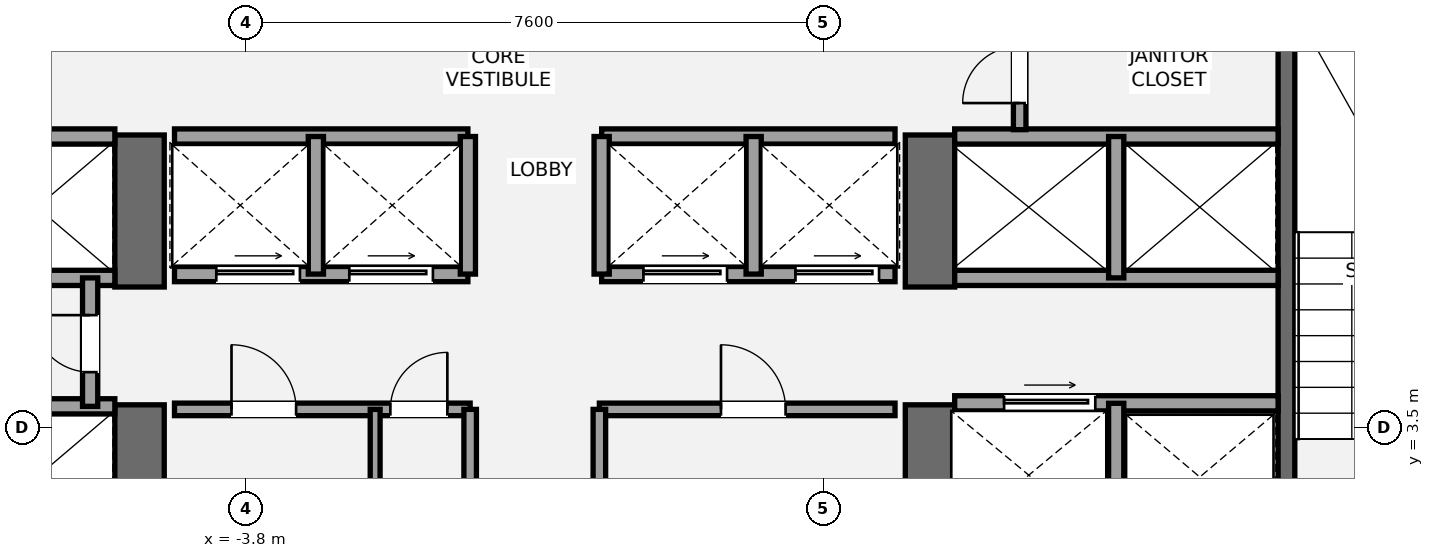
"""IFC4 building model, lengths in metres.
Left out: names, types, materials, properties, quantities, classifications, styles, units other than length and angle.
Written with IfcOpenShell. Run it as: python <this file> out.ifc"""

import sys

from ifc_helpers import new_model, si_unit, direction, frame, frame_2d, origin, place, context, subcontext, project, spatial, rectangle, extrude, element, fill, save


model = new_model("IFC4")
c1 = context("Model", 3, precision=1e-05, world=origin(), true_north=direction((0.0, 1.0)))
c2 = subcontext(c1, "Body", "Model", "MODEL_VIEW")
j1 = project(units=[si_unit("LENGTHUNIT", "METRE"), si_unit("PLANEANGLEUNIT", "RADIAN")], contexts=[c1])
p1 = place(None, origin())
s1 = spatial("IfcSite", under=j1, at=p1, CompositionType="ELEMENT")
p2 = place(p1, origin())
s2 = spatial("IfcBuilding", under=s1, at=p2, CompositionType="ELEMENT")
p3 = place(p2, frame((0.0, 0.0, 159.8)))
s3 = spatial("IfcBuildingStorey", under=s2, at=p3, CompositionType="ELEMENT", Elevation=159.8)
p4 = place(p3, frame((-5.2, 1.2, 0.0), z_axis=(0.0, 0.0, 1.0), x_axis=(0.0, 1.0, 0.0)))
e1 = element("IfcWall", 1, at=p4, inside=s3, PredefinedType="SHEAR", context=c2, shape_type="SweptSolid", body=[
    extrude(rectangle(XDim=2.6, YDim=0.65, at=frame_2d((1.3, 0.0))), origin(), (0.0, 0.0, 1.0), 3.2),
])
p5 = place(p3, frame((-5.2, 5.35, 0.0), z_axis=(0.0, 0.0, 1.0), x_axis=(0.0, 1.0, 0.0)))
e2 = element("IfcWall", 2, at=p5, inside=s3, PredefinedType="SHEAR", context=c2, shape_type="SweptSolid", body=[
    extrude(rectangle(XDim=2.0, YDim=0.65, at=frame_2d((1.0, 0.0))), origin(), (0.0, 0.0, 1.0), 3.2),
])
p6 = place(p3, frame((5.2, 1.2, 0.0), z_axis=(0.0, 0.0, 1.0), x_axis=(0.0, 1.0, 0.0)))
e3 = element("IfcWall", 3, at=p6, inside=s3, PredefinedType="SHEAR", context=c2, shape_type="SweptSolid", body=[
    extrude(rectangle(XDim=2.6, YDim=0.65, at=frame_2d((1.3, 0.0))), origin(), (0.0, 0.0, 1.0), 3.2),
])
p7 = place(p3, frame((5.2, 5.35, 0.0), z_axis=(0.0, 0.0, 1.0), x_axis=(0.0, 1.0, 0.0)))
e4 = element("IfcWall", 4, at=p7, inside=s3, PredefinedType="SHEAR", context=c2, shape_type="SweptSolid", body=[
    extrude(rectangle(XDim=2.0, YDim=0.65, at=frame_2d((1.0, 0.0))), origin(), (0.0, 0.0, 1.0), 3.2),
])
p8 = place(p3, frame((9.89, 1.85, 0.0), z_axis=(0.0, 0.0, 1.0), x_axis=(0.0, 1.0, 0.0)))
e5 = element("IfcWall", 5, at=p8, inside=s3, PredefinedType="SHEAR", context=c2, shape_type="SweptSolid", body=[
    extrude(rectangle(XDim=7.15, YDim=0.22, at=frame_2d((3.575, 0.0))), origin(), (0.0, 0.0, 1.0), 3.2),
])
for number, where, z_axis, x_axis in (
    (6, (-9.78, 3.78, 0.0), (0.0, 0.0, 1.0), (1.0, 0.0, 0.0)),
    (7, (-9.78, 5.47, 0.0), (0.0, 0.0, 1.0), (1.0, 0.0, 0.0)),
    (8, (-9.78, 7.33, 0.0), (0.0, 0.0, 1.0), (1.0, 0.0, 0.0)),
):
    element("IfcWall", number, at=place(p3, frame(where, z_axis=z_axis, x_axis=x_axis)), inside=s3, PredefinedType="SOLIDWALL", context=c2, shape_type="SweptSolid", body=[
        extrude(rectangle(XDim=4.255, YDim=0.2, at=frame_2d((2.127, 0.0))), origin(), (0.0, 0.0, 1.0), 3.02),
    ])
p9 = place(p3, frame((-5.85, 3.78, 0.0), z_axis=(0.0, 0.0, 1.0), x_axis=(0.0, 1.0, 0.0)))
e9 = element("IfcWall", 9, at=p9, inside=s3, PredefinedType="SOLIDWALL", context=c2, shape_type="SweptSolid", body=[
    extrude(rectangle(XDim=1.69, YDim=0.2, at=frame_2d((0.845, 0.0))), origin(), (0.0, 0.0, 1.0), 3.02),
])
p10 = place(p9, frame((0.45, 0.0, 0.0)))
e10 = element("IfcOpeningElement", 10, at=p10, cuts=e9, PredefinedType="OPENING", context=c2, shape_type="SweptSolid", body=[
    extrude(rectangle(XDim=0.75, YDim=2.1, at=frame_2d((0.375, 1.05))), frame((0.0, 0.11, 0.0), z_axis=(0.0, -1.0, 0.0), x_axis=(1.0, 0.0, 0.0)), (0.0, 0.0, 1.0), 0.22),
])
p11 = place(p3, frame((5.525, 3.82, 0.0), z_axis=(0.0, 0.0, 1.0), x_axis=(1.0, 0.0, 0.0)))
e11 = element("IfcWall", 11, at=p11, inside=s3, PredefinedType="SOLIDWALL", context=c2, shape_type="SweptSolid", body=[
    extrude(rectangle(XDim=4.255, YDim=0.2, at=frame_2d((2.127, 0.0))), origin(), (0.0, 0.0, 1.0), 3.02),
])
p12 = place(p11, frame((0.65, 0.0, 0.0)))
e12 = element("IfcOpeningElement", 12, at=p12, cuts=e11, PredefinedType="OPENING", context=c2, shape_type="SweptSolid", body=[
    extrude(rectangle(XDim=1.2, YDim=2.2, at=frame_2d((0.6, 1.1))), frame((0.0, 0.11, 0.0), z_axis=(0.0, -1.0, 0.0), x_axis=(1.0, 0.0, 0.0)), (0.0, 0.0, 1.0), 0.22),
])
p13 = place(p3, frame((7.65, 1.85, 0.0), z_axis=(0.0, 0.0, 1.0), x_axis=(0.0, 1.0, 0.0)))
e13 = element("IfcWall", 13, at=p13, inside=s3, PredefinedType="SOLIDWALL", context=c2, shape_type="SweptSolid", body=[
    extrude(rectangle(XDim=1.97, YDim=0.2, at=frame_2d((0.985, 0.0))), origin(), (0.0, 0.0, 1.0), 3.02),
])
for number, where, z_axis, x_axis in (
    (14, (5.525, 5.47, 0.0), (0.0, 0.0, 1.0), (1.0, 0.0, 0.0)),
    (15, (5.525, 7.33, 0.0), (0.0, 0.0, 1.0), (1.0, 0.0, 0.0)),
):
    element("IfcWall", number, at=place(p3, frame(where, z_axis=z_axis, x_axis=x_axis)), inside=s3, PredefinedType="SOLIDWALL", context=c2, shape_type="SweptSolid", body=[
        extrude(rectangle(XDim=4.255, YDim=0.2, at=frame_2d((2.127, 0.0))), origin(), (0.0, 0.0, 1.0), 3.02),
    ])
p14 = place(p3, frame((7.65, 5.47, 0.0), z_axis=(0.0, 0.0, 1.0), x_axis=(0.0, 1.0, 0.0)))
e16 = element("IfcWall", 16, at=p14, inside=s3, PredefinedType="SOLIDWALL", context=c2, shape_type="SweptSolid", body=[
    extrude(rectangle(XDim=1.86, YDim=0.2, at=frame_2d((0.93, 0.0))), origin(), (0.0, 0.0, 1.0), 3.02),
])
p15 = place(p3, frame((-4.74, 3.74, 0.0), z_axis=(0.0, 0.0, 1.0), x_axis=(1.0, 0.0, 0.0)))
e17 = element("IfcWall", 17, at=p15, inside=s3, PredefinedType="PARTITIONING", context=c2, shape_type="SweptSolid", body=[
    extrude(rectangle(XDim=3.89, YDim=0.165, at=frame_2d((1.945, 0.0))), origin(), (0.0, 0.0, 1.0), 3.02),
])
p16 = place(p15, frame((0.75, 0.0, 0.0)))
e18 = element("IfcOpeningElement", 18, at=p16, cuts=e17, PredefinedType="OPENING", context=c2, shape_type="SweptSolid", body=[
    extrude(rectangle(XDim=0.85, YDim=2.1, at=frame_2d((0.425, 1.05))), frame((0.0, 0.093, 0.0), z_axis=(0.0, -1.0, 0.0), x_axis=(1.0, 0.0, 0.0)), (0.0, 0.0, 1.0), 0.185),
])
p17 = place(p15, frame((2.84, 0.0, 0.0)))
e19 = element("IfcOpeningElement", 19, at=p17, cuts=e17, PredefinedType="OPENING", context=c2, shape_type="SweptSolid", body=[
    extrude(rectangle(XDim=0.75, YDim=2.1, at=frame_2d((0.375, 1.05))), frame((0.0, 0.093, 0.0), z_axis=(0.0, -1.0, 0.0), x_axis=(1.0, 0.0, 0.0)), (0.0, 0.0, 1.0), 0.185),
])
p18 = place(p3, frame((-0.85, 1.92, 0.0), z_axis=(0.0, 0.0, 1.0), x_axis=(0.0, 1.0, 0.0)))
e20 = element("IfcWall", 20, at=p18, inside=s3, PredefinedType="PARTITIONING", context=c2, shape_type="SweptSolid", body=[
    extrude(rectangle(XDim=1.82, YDim=0.165, at=frame_2d((0.91, 0.0))), origin(), (0.0, 0.0, 1.0), 3.02),
])
p19 = place(p3, frame((0.85, 3.74, 0.0), z_axis=(0.0, 0.0, 1.0), x_axis=(1.0, 0.0, 0.0)))
e21 = element("IfcWall", 21, at=p19, inside=s3, PredefinedType="PARTITIONING", context=c2, shape_type="SweptSolid", body=[
    extrude(rectangle(XDim=3.89, YDim=0.165, at=frame_2d((1.945, 0.0))), origin(), (0.0, 0.0, 1.0), 3.02),
])
p20 = place(p19, frame((1.6, 0.0, 0.0)))
e22 = element("IfcOpeningElement", 22, at=p20, cuts=e21, PredefinedType="OPENING", context=c2, shape_type="SweptSolid", body=[
    extrude(rectangle(XDim=0.85, YDim=2.1, at=frame_2d((0.425, 1.05))), frame((0.0, 0.093, 0.0), z_axis=(0.0, -1.0, 0.0), x_axis=(1.0, 0.0, 0.0)), (0.0, 0.0, 1.0), 0.185),
])
p21 = place(p3, frame((0.85, 1.92, 0.0), z_axis=(0.0, 0.0, 1.0), x_axis=(0.0, 1.0, 0.0)))
e23 = element("IfcWall", 23, at=p21, inside=s3, PredefinedType="PARTITIONING", context=c2, shape_type="SweptSolid", body=[
    extrude(rectangle(XDim=1.82, YDim=0.165, at=frame_2d((0.91, 0.0))), origin(), (0.0, 0.0, 1.0), 3.02),
])
p22 = place(p3, frame((-2.1, 1.92, 0.0), z_axis=(0.0, 0.0, 1.0), x_axis=(0.0, 1.0, 0.0)))
e24 = element("IfcWall", 24, at=p22, inside=s3, PredefinedType="PARTITIONING", context=c2, shape_type="SweptSolid", body=[
    extrude(rectangle(XDim=1.82, YDim=0.13, at=frame_2d((0.91, 0.0))), origin(), (0.0, 0.0, 1.0), 3.02),
])
p23 = place(p3, frame((-4.74, 5.52, 0.0), z_axis=(0.0, 0.0, 1.0), x_axis=(1.0, 0.0, 0.0)))
e25 = element("IfcWall", 25, at=p23, inside=s3, PredefinedType="SOLIDWALL", context=c2, shape_type="SweptSolid", body=[
    extrude(rectangle(XDim=3.86, YDim=0.2, at=frame_2d((1.93, 0.0))), origin(), (0.0, 0.0, 1.0), 3.02),
])
p24 = place(p23, frame((0.55, 0.0, 0.0)))
e26 = element("IfcOpeningElement", 26, at=p24, cuts=e25, PredefinedType="OPENING", context=c2, shape_type="SweptSolid", body=[
    extrude(rectangle(XDim=1.1, YDim=2.2, at=frame_2d((0.55, 1.1))), frame((0.0, 0.11, 0.0), z_axis=(0.0, -1.0, 0.0), x_axis=(1.0, 0.0, 0.0)), (0.0, 0.0, 1.0), 0.22),
])
p25 = place(p23, frame((2.3, 0.0, 0.0)))
e27 = element("IfcOpeningElement", 27, at=p25, cuts=e25, PredefinedType="OPENING", context=c2, shape_type="SweptSolid", body=[
    extrude(rectangle(XDim=1.1, YDim=2.2, at=frame_2d((0.55, 1.1))), frame((0.0, 0.11, 0.0), z_axis=(0.0, -1.0, 0.0), x_axis=(1.0, 0.0, 0.0)), (0.0, 0.0, 1.0), 0.22),
])
p26 = place(p3, frame((0.88, 5.52, 0.0), z_axis=(0.0, 0.0, 1.0), x_axis=(1.0, 0.0, 0.0)))
e28 = element("IfcWall", 28, at=p26, inside=s3, PredefinedType="SOLIDWALL", context=c2, shape_type="SweptSolid", body=[
    extrude(rectangle(XDim=3.86, YDim=0.2, at=frame_2d((1.93, 0.0))), origin(), (0.0, 0.0, 1.0), 3.02),
])
p27 = place(p26, frame((0.55, 0.0, 0.0)))
e29 = element("IfcOpeningElement", 29, at=p27, cuts=e28, PredefinedType="OPENING", context=c2, shape_type="SweptSolid", body=[
    extrude(rectangle(XDim=1.1, YDim=2.2, at=frame_2d((0.55, 1.1))), frame((0.0, 0.11, 0.0), z_axis=(0.0, -1.0, 0.0), x_axis=(1.0, 0.0, 0.0)), (0.0, 0.0, 1.0), 0.22),
])
p28 = place(p26, frame((2.55, 0.0, 0.0)))
e30 = element("IfcOpeningElement", 30, at=p28, cuts=e28, PredefinedType="OPENING", context=c2, shape_type="SweptSolid", body=[
    extrude(rectangle(XDim=1.1, YDim=2.2, at=frame_2d((0.55, 1.1))), frame((0.0, 0.11, 0.0), z_axis=(0.0, -1.0, 0.0), x_axis=(1.0, 0.0, 0.0)), (0.0, 0.0, 1.0), 0.22),
])
for number, where, z_axis, x_axis in (
    (31, (-4.74, 7.33, 0.0), (0.0, 0.0, 1.0), (1.0, 0.0, 0.0)),
    (32, (0.88, 7.33, 0.0), (0.0, 0.0, 1.0), (1.0, 0.0, 0.0)),
):
    element("IfcWall", number, at=place(p3, frame(where, z_axis=z_axis, x_axis=x_axis)), inside=s3, PredefinedType="SOLIDWALL", context=c2, shape_type="SweptSolid", body=[
        extrude(rectangle(XDim=3.86, YDim=0.2, at=frame_2d((1.93, 0.0))), origin(), (0.0, 0.0, 1.0), 3.02),
    ])
for number, where, z_axis, x_axis in (
    (33, (-2.88, 5.52, 0.0), (0.0, 0.0, 1.0), (0.0, 1.0, 0.0)),
    (34, (2.88, 5.52, 0.0), (0.0, 0.0, 1.0), (0.0, 1.0, 0.0)),
    (35, (-0.88, 5.52, 0.0), (0.0, 0.0, 1.0), (0.0, 1.0, 0.0)),
    (36, (0.88, 5.52, 0.0), (0.0, 0.0, 1.0), (0.0, 1.0, 0.0)),
):
    element("IfcWall", number, at=place(p3, frame(where, z_axis=z_axis, x_axis=x_axis)), inside=s3, PredefinedType="SOLIDWALL", context=c2, shape_type="SweptSolid", body=[
        extrude(rectangle(XDim=1.81, YDim=0.2, at=frame_2d((0.905, 0.0))), origin(), (0.0, 0.0, 1.0), 3.02),
    ])
p29 = place(p3, frame((6.38, 7.42, 0.0), z_axis=(0.0, 0.0, 1.0), x_axis=(0.0, 1.0, 0.0)))
e37 = element("IfcWall", 37, at=p29, inside=s3, PredefinedType="PARTITIONING", context=c2, shape_type="SweptSolid", body=[
    extrude(rectangle(XDim=1.58, YDim=0.165, at=frame_2d((0.79, 0.0))), origin(), (0.0, 0.0, 1.0), 3.02),
])
p30 = place(p29, frame((0.35, 0.0, 0.0)))
e38 = element("IfcOpeningElement", 38, at=p30, cuts=e37, PredefinedType="OPENING", context=c2, shape_type="SweptSolid", body=[
    extrude(rectangle(XDim=0.75, YDim=2.1, at=frame_2d((0.375, 1.05))), frame((0.0, 0.093, 0.0), z_axis=(0.0, -1.0, 0.0), x_axis=(1.0, 0.0, 0.0)), (0.0, 0.0, 1.0), 0.185),
])
p31 = place(p10, origin())
e39 = element("IfcDoor", 39, at=p31, inside=s3, OperationType="SINGLE_SWING_RIGHT", PredefinedType="DOOR", context=c2, shape_type="SweptSolid", body=[
    extrude(rectangle(XDim=0.75, YDim=2.1, at=frame_2d((0.375, 1.05))), frame((0.0, 0.025, 0.0), z_axis=(0.0, -1.0, 0.0), x_axis=(1.0, 0.0, 0.0)), (0.0, 0.0, 1.0), 0.05),
])
fill(e10, e39)
p32 = place(p12, origin())
e40 = element("IfcDoor", 40, at=p32, inside=s3, OperationType="SLIDING_TO_RIGHT", PredefinedType="DOOR", context=c2, shape_type="SweptSolid", body=[
    extrude(rectangle(XDim=1.2, YDim=2.2, at=frame_2d((0.6, 1.1))), frame((0.0, 0.025, 0.0), z_axis=(0.0, -1.0, 0.0), x_axis=(1.0, 0.0, 0.0)), (0.0, 0.0, 1.0), 0.05),
])
fill(e12, e40)
p33 = place(p16, origin())
e41 = element("IfcDoor", 41, at=p33, inside=s3, OperationType="SINGLE_SWING_LEFT", PredefinedType="DOOR", context=c2, shape_type="SweptSolid", body=[
    extrude(rectangle(XDim=0.85, YDim=2.1, at=frame_2d((0.425, 1.05))), frame((0.0, 0.025, 0.0), z_axis=(0.0, -1.0, 0.0), x_axis=(1.0, 0.0, 0.0)), (0.0, 0.0, 1.0), 0.05),
])
fill(e18, e41)
p34 = place(p17, origin())
e42 = element("IfcDoor", 42, at=p34, inside=s3, OperationType="SINGLE_SWING_RIGHT", PredefinedType="DOOR", context=c2, shape_type="SweptSolid", body=[
    extrude(rectangle(XDim=0.75, YDim=2.1, at=frame_2d((0.375, 1.05))), frame((0.0, 0.025, 0.0), z_axis=(0.0, -1.0, 0.0), x_axis=(1.0, 0.0, 0.0)), (0.0, 0.0, 1.0), 0.05),
])
fill(e19, e42)
p35 = place(p20, origin())
e43 = element("IfcDoor", 43, at=p35, inside=s3, OperationType="SINGLE_SWING_LEFT", PredefinedType="DOOR", context=c2, shape_type="SweptSolid", body=[
    extrude(rectangle(XDim=0.85, YDim=2.1, at=frame_2d((0.425, 1.05))), frame((0.0, 0.025, 0.0), z_axis=(0.0, -1.0, 0.0), x_axis=(1.0, 0.0, 0.0)), (0.0, 0.0, 1.0), 0.05),
])
fill(e22, e43)
p36 = place(p24, origin())
e44 = element("IfcDoor", 44, at=p36, inside=s3, OperationType="SLIDING_TO_LEFT", PredefinedType="DOOR", context=c2, shape_type="SweptSolid", body=[
    extrude(rectangle(XDim=1.1, YDim=2.2, at=frame_2d((0.55, 1.1))), frame((0.0, 0.025, 0.0), z_axis=(0.0, -1.0, 0.0), x_axis=(1.0, 0.0, 0.0)), (0.0, 0.0, 1.0), 0.05),
])
fill(e26, e44)
p37 = place(p25, origin())
e45 = element("IfcDoor", 45, at=p37, inside=s3, OperationType="SLIDING_TO_LEFT", PredefinedType="DOOR", context=c2, shape_type="SweptSolid", body=[
    extrude(rectangle(XDim=1.1, YDim=2.2, at=frame_2d((0.55, 1.1))), frame((0.0, 0.025, 0.0), z_axis=(0.0, -1.0, 0.0), x_axis=(1.0, 0.0, 0.0)), (0.0, 0.0, 1.0), 0.05),
])
fill(e27, e45)
p38 = place(p27, origin())
e46 = element("IfcDoor", 46, at=p38, inside=s3, OperationType="SLIDING_TO_LEFT", PredefinedType="DOOR", context=c2, shape_type="SweptSolid", body=[
    extrude(rectangle(XDim=1.1, YDim=2.2, at=frame_2d((0.55, 1.1))), frame((0.0, 0.025, 0.0), z_axis=(0.0, -1.0, 0.0), x_axis=(1.0, 0.0, 0.0)), (0.0, 0.0, 1.0), 0.05),
])
fill(e29, e46)
p39 = place(p28, origin())
e47 = element("IfcDoor", 47, at=p39, inside=s3, OperationType="SLIDING_TO_LEFT", PredefinedType="DOOR", context=c2, shape_type="SweptSolid", body=[
    extrude(rectangle(XDim=1.1, YDim=2.2, at=frame_2d((0.55, 1.1))), frame((0.0, 0.025, 0.0), z_axis=(0.0, -1.0, 0.0), x_axis=(1.0, 0.0, 0.0)), (0.0, 0.0, 1.0), 0.05),
])
fill(e30, e47)
p40 = place(p30, origin())
e48 = element("IfcDoor", 48, at=p40, inside=s3, OperationType="SINGLE_SWING_LEFT", PredefinedType="DOOR", context=c2, shape_type="SweptSolid", body=[
    extrude(rectangle(XDim=0.75, YDim=2.1, at=frame_2d((0.375, 1.05))), frame((0.0, 0.025, 0.0), z_axis=(0.0, -1.0, 0.0), x_axis=(1.0, 0.0, 0.0)), (0.0, 0.0, 1.0), 0.05),
])
fill(e38, e48)
save(model, sys.argv[1])
